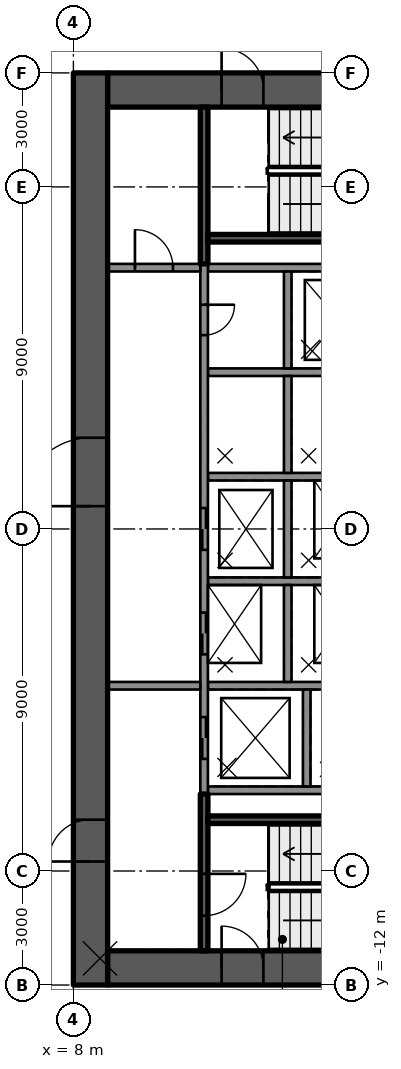
"""IFC4 building model, lengths in metres.
Left out: names, types, materials, properties, quantities, classifications, styles, units other than length and angle.
Written with IfcOpenShell. Run it as: python <this file> out.ifc"""

import sys

from ifc_helpers import new_model, si_unit, direction, frame, frame_2d, origin, place, context, subcontext, project, spatial, rectangle, extrude, element, fill, save


model = new_model("IFC4")
c1 = context("Model", 3, precision=1e-05, world=origin(), true_north=direction((0.0, 1.0)))
c2 = subcontext(c1, "Body", "Model", "MODEL_VIEW")
j1 = project(units=[si_unit("LENGTHUNIT", "METRE"), si_unit("PLANEANGLEUNIT", "RADIAN")], contexts=[c1])
p1 = place(None, origin())
s1 = spatial("IfcSite", under=j1, at=p1, CompositionType="ELEMENT")
p2 = place(p1, origin())
s2 = spatial("IfcBuilding", under=s1, at=p2, CompositionType="ELEMENT")
p3 = place(p2, frame((0.0, 0.0, 102.2)))
s3 = spatial("IfcBuildingStorey", under=s2, at=p3, CompositionType="ELEMENT", Elevation=102.2)
p4 = place(p3, frame((8.9, 11.55, 0.0), z_axis=(0.0, 0.0, 1.0), x_axis=(1.0, 0.0, 0.0)))
e1 = element("IfcWall", 1, at=p4, inside=s3, PredefinedType="SHEAR", context=c2, shape_type="SweptSolid", body=[
    extrude(rectangle(XDim=9.2, YDim=0.9, at=frame_2d((4.6, 0.0))), origin(), (0.0, 0.0, 1.0), 3.5),
])
p5 = place(p4, frame((3.0, 0.0, 0.0)))
e2 = element("IfcOpeningElement", 2, at=p5, cuts=e1, PredefinedType="OPENING", context=c2, shape_type="SweptSolid", body=[
    extrude(rectangle(XDim=1.1, YDim=2.1, at=frame_2d((0.55, 1.05))), frame((0.0, 0.46, 0.0), z_axis=(0.0, -1.0, 0.0), x_axis=(1.0, 0.0, 0.0)), (0.0, 0.0, 1.0), 0.92),
])
p6 = place(p3, frame((8.9, -11.55, 0.0), z_axis=(0.0, 0.0, 1.0), x_axis=(1.0, 0.0, 0.0)))
e3 = element("IfcWall", 3, at=p6, inside=s3, PredefinedType="SHEAR", context=c2, shape_type="SweptSolid", body=[
    extrude(rectangle(XDim=9.2, YDim=0.9, at=frame_2d((4.6, 0.0))), origin(), (0.0, 0.0, 1.0), 3.5),
])
p7 = place(p6, frame((3.0, 0.0, 0.0)))
e4 = element("IfcOpeningElement", 4, at=p7, cuts=e3, PredefinedType="OPENING", context=c2, shape_type="SweptSolid", body=[
    extrude(rectangle(XDim=1.1, YDim=2.1, at=frame_2d((0.55, 1.05))), frame((0.0, 0.46, 0.0), z_axis=(0.0, -1.0, 0.0), x_axis=(1.0, 0.0, 0.0)), (0.0, 0.0, 1.0), 0.92),
])
p8 = place(p3, frame((8.45, -12.0, 0.0), z_axis=(0.0, 0.0, 1.0), x_axis=(0.0, 1.0, 0.0)))
e5 = element("IfcWall", 5, at=p8, inside=s3, PredefinedType="SHEAR", context=c2, shape_type="SweptSolid", body=[
    extrude(rectangle(XDim=24.0, YDim=0.9, at=frame_2d((12.0, 0.0))), origin(), (0.0, 0.0, 1.0), 3.5),
])
p9 = place(p8, frame((12.6, 0.0, 0.0)))
e6 = element("IfcOpeningElement", 6, at=p9, cuts=e5, PredefinedType="OPENING", context=c2, shape_type="SweptSolid", body=[
    extrude(rectangle(XDim=1.8, YDim=2.1, at=frame_2d((0.9, 1.05))), frame((0.0, 0.46, 0.0), z_axis=(0.0, -1.0, 0.0), x_axis=(1.0, 0.0, 0.0)), (0.0, 0.0, 1.0), 0.92),
])
p10 = place(p8, frame((3.25, 0.0, 0.0)))
e7 = element("IfcOpeningElement", 7, at=p10, cuts=e5, PredefinedType="OPENING", context=c2, shape_type="SweptSolid", body=[
    extrude(rectangle(XDim=1.1, YDim=2.1, at=frame_2d((0.55, 1.05))), frame((0.0, 0.46, 0.0), z_axis=(0.0, -1.0, 0.0), x_axis=(1.0, 0.0, 0.0)), (0.0, 0.0, 1.0), 0.92),
])
for number, where, z_axis, x_axis in (
    (8, (11.54, -6.875, 0.0), (0.0, 0.0, 1.0), (1.0, 0.0, 0.0)),
    (9, (11.54, 6.875, 0.0), (0.0, 0.0, 1.0), (1.0, 0.0, 0.0)),
):
    element("IfcWall", number, at=place(p3, frame(where, z_axis=z_axis, x_axis=x_axis)), inside=s3, PredefinedType="SOLIDWALL", context=c2, shape_type="SweptSolid", body=[
        extrude(rectangle(XDim=6.56, YDim=0.2, at=frame_2d((3.28, 0.0))), origin(), (0.0, 0.0, 1.0), 3.09),
    ])
p11 = place(p3, frame((11.54, 4.125, 0.0), z_axis=(0.0, 0.0, 1.0), x_axis=(1.0, 0.0, 0.0)))
e10 = element("IfcWall", 10, at=p11, inside=s3, PredefinedType="SOLIDWALL", context=c2, shape_type="SweptSolid", body=[
    extrude(rectangle(XDim=4.7, YDim=0.2, at=frame_2d((2.35, 0.0))), origin(), (0.0, 0.0, 1.0), 3.09),
])
for number, where, z_axis, x_axis in (
    (11, (11.54, 1.375, 0.0), (0.0, 0.0, 1.0), (1.0, 0.0, 0.0)),
    (12, (11.54, -1.375, 0.0), (0.0, 0.0, 1.0), (1.0, 0.0, 0.0)),
):
    element("IfcWall", number, at=place(p3, frame(where, z_axis=z_axis, x_axis=x_axis)), inside=s3, PredefinedType="SOLIDWALL", context=c2, shape_type="SweptSolid", body=[
        extrude(rectangle(XDim=4.2, YDim=0.2, at=frame_2d((2.1, 0.0))), origin(), (0.0, 0.0, 1.0), 3.09),
    ])
p12 = place(p3, frame((11.54, -4.125, 0.0), z_axis=(0.0, 0.0, 1.0), x_axis=(1.0, 0.0, 0.0)))
e13 = element("IfcWall", 13, at=p12, inside=s3, PredefinedType="SOLIDWALL", context=c2, shape_type="SweptSolid", body=[
    extrude(rectangle(XDim=4.7, YDim=0.2, at=frame_2d((2.35, 0.0))), origin(), (0.0, 0.0, 1.0), 3.09),
])
p13 = place(p3, frame((11.44, 6.975, 0.0), z_axis=(0.0, 0.0, 1.0), x_axis=(0.0, -1.0, 0.0)))
e14 = element("IfcWall", 14, at=p13, inside=s3, PredefinedType="SOLIDWALL", context=c2, shape_type="SweptSolid", body=[
    extrude(rectangle(XDim=13.95, YDim=0.2, at=frame_2d((6.975, 0.0))), origin(), (0.0, 0.0, 1.0), 3.09),
])
p14 = place(p13, frame((6.425, 0.0, 0.0)))
e15 = element("IfcOpeningElement", 15, at=p14, cuts=e14, PredefinedType="OPENING", context=c2, shape_type="SweptSolid", body=[
    extrude(rectangle(XDim=1.1, YDim=2.1, at=frame_2d((0.55, 1.05))), frame((0.0, 0.11, 0.0), z_axis=(0.0, -1.0, 0.0), x_axis=(1.0, 0.0, 0.0)), (0.0, 0.0, 1.0), 0.22),
])
p15 = place(p13, frame((9.175, 0.0, 0.0)))
e16 = element("IfcOpeningElement", 16, at=p15, cuts=e14, PredefinedType="OPENING", context=c2, shape_type="SweptSolid", body=[
    extrude(rectangle(XDim=1.1, YDim=2.1, at=frame_2d((0.55, 1.05))), frame((0.0, 0.11, 0.0), z_axis=(0.0, -1.0, 0.0), x_axis=(1.0, 0.0, 0.0)), (0.0, 0.0, 1.0), 0.22),
])
p16 = place(p13, frame((11.925, 0.0, 0.0)))
e17 = element("IfcOpeningElement", 17, at=p16, cuts=e14, PredefinedType="OPENING", context=c2, shape_type="SweptSolid", body=[
    extrude(rectangle(XDim=1.1, YDim=2.1, at=frame_2d((0.55, 1.05))), frame((0.0, 0.11, 0.0), z_axis=(0.0, -1.0, 0.0), x_axis=(1.0, 0.0, 0.0)), (0.0, 0.0, 1.0), 0.22),
])
p17 = place(p13, frame((1.075, 0.0, 0.0)))
e18 = element("IfcOpeningElement", 18, at=p17, cuts=e14, PredefinedType="OPENING", context=c2, shape_type="SweptSolid", body=[
    extrude(rectangle(XDim=0.8, YDim=2.1, at=frame_2d((0.4, 1.05))), frame((0.0, 0.11, 0.0), z_axis=(0.0, -1.0, 0.0), x_axis=(1.0, 0.0, 0.0)), (0.0, 0.0, 1.0), 0.22),
])
for number, where, z_axis, x_axis in (
    (19, (13.64, 6.775, 0.0), (0.0, 0.0, 1.0), (0.0, -1.0, 0.0)),
    (20, (13.64, 4.025, 0.0), (0.0, 0.0, 1.0), (0.0, -1.0, 0.0)),
    (21, (13.64, 1.275, 0.0), (0.0, 0.0, 1.0), (0.0, -1.0, 0.0)),
    (22, (13.64, -1.475, 0.0), (0.0, 0.0, 1.0), (0.0, -1.0, 0.0)),
    (23, (14.14, -4.225, 0.0), (0.0, 0.0, 1.0), (0.0, -1.0, 0.0)),
):
    element("IfcWall", number, at=place(p3, frame(where, z_axis=z_axis, x_axis=x_axis)), inside=s3, PredefinedType="SOLIDWALL", context=c2, shape_type="SweptSolid", body=[
        extrude(rectangle(XDim=2.55, YDim=0.2, at=frame_2d((1.275, 0.0))), origin(), (0.0, 0.0, 1.0), 3.09),
    ])
p18 = place(p3, frame((11.44, -6.975, 0.0), z_axis=(0.0, 0.0, 1.0), x_axis=(0.0, -1.0, 0.0)))
e24 = element("IfcWall", 24, at=p18, inside=s3, PredefinedType="SOLIDWALL", context=c2, shape_type="SweptSolid", body=[
    extrude(rectangle(XDim=4.125, YDim=0.2, at=frame_2d((2.062, 0.0))), origin(), (0.0, 0.0, 1.0), 3.09),
])
p19 = place(p18, frame((2.1, 0.0, 0.0)))
e25 = element("IfcOpeningElement", 25, at=p19, cuts=e24, PredefinedType="OPENING", context=c2, shape_type="SweptSolid", body=[
    extrude(rectangle(XDim=1.1, YDim=2.1, at=frame_2d((0.55, 1.05))), frame((0.0, 0.11, 0.0), z_axis=(0.0, -1.0, 0.0), x_axis=(1.0, 0.0, 0.0)), (0.0, 0.0, 1.0), 0.22),
])
p20 = place(p3, frame((11.54, -7.65, 0.0), z_axis=(0.0, 0.0, 1.0), x_axis=(1.0, 0.0, 0.0)))
e26 = element("IfcWall", 26, at=p20, inside=s3, PredefinedType="SOLIDWALL", context=c2, shape_type="SweptSolid", body=[
    extrude(rectangle(XDim=6.56, YDim=0.2, at=frame_2d((3.28, 0.0))), origin(), (0.0, 0.0, 1.0), 3.09),
])
p21 = place(p3, frame((11.44, 11.1, 0.0), z_axis=(0.0, 0.0, 1.0), x_axis=(0.0, -1.0, 0.0)))
e27 = element("IfcWall", 27, at=p21, inside=s3, PredefinedType="SOLIDWALL", context=c2, shape_type="SweptSolid", body=[
    extrude(rectangle(XDim=4.125, YDim=0.2, at=frame_2d((2.062, 0.0))), origin(), (0.0, 0.0, 1.0), 3.09),
])
p22 = place(p3, frame((11.54, 7.65, 0.0), z_axis=(0.0, 0.0, 1.0), x_axis=(1.0, 0.0, 0.0)))
e28 = element("IfcWall", 28, at=p22, inside=s3, PredefinedType="SOLIDWALL", context=c2, shape_type="SweptSolid", body=[
    extrude(rectangle(XDim=6.56, YDim=0.2, at=frame_2d((3.28, 0.0))), origin(), (0.0, 0.0, 1.0), 3.09),
])
p23 = place(p3, frame((8.9, -4.125, 0.0), z_axis=(0.0, 0.0, 1.0), x_axis=(1.0, 0.0, 0.0)))
e29 = element("IfcWall", 29, at=p23, inside=s3, PredefinedType="PARTITIONING", context=c2, shape_type="SweptSolid", body=[
    extrude(rectangle(XDim=2.44, YDim=0.2, at=frame_2d((1.22, 0.0))), origin(), (0.0, 0.0, 1.0), 3.09),
])
p24 = place(p3, frame((8.9, 6.875, 0.0), z_axis=(0.0, 0.0, 1.0), x_axis=(1.0, 0.0, 0.0)))
e30 = element("IfcWall", 30, at=p24, inside=s3, PredefinedType="PARTITIONING", context=c2, shape_type="SweptSolid", body=[
    extrude(rectangle(XDim=2.44, YDim=0.2, at=frame_2d((1.22, 0.0))), origin(), (0.0, 0.0, 1.0), 3.09),
])
p25 = place(p24, frame((0.72, 0.0, 0.0)))
e31 = element("IfcOpeningElement", 31, at=p25, cuts=e30, PredefinedType="OPENING", context=c2, shape_type="SweptSolid", body=[
    extrude(rectangle(XDim=1.0, YDim=2.1, at=frame_2d((0.5, 1.05))), frame((0.0, 0.11, 0.0), z_axis=(0.0, -1.0, 0.0), x_axis=(1.0, 0.0, 0.0)), (0.0, 0.0, 1.0), 0.22),
])
p26 = place(p14, origin())
e32 = element("IfcDoor", 32, at=p26, inside=s3, OperationType="DOUBLE_DOOR_SLIDING", PredefinedType="DOOR", context=c2, shape_type="SweptSolid", body=[
    extrude(rectangle(XDim=1.1, YDim=2.1, at=frame_2d((0.55, 1.05))), frame((0.0, 0.025, 0.0), z_axis=(0.0, -1.0, 0.0), x_axis=(1.0, 0.0, 0.0)), (0.0, 0.0, 1.0), 0.05),
])
fill(e15, e32)
p27 = place(p15, origin())
e33 = element("IfcDoor", 33, at=p27, inside=s3, OperationType="DOUBLE_DOOR_SLIDING", PredefinedType="DOOR", context=c2, shape_type="SweptSolid", body=[
    extrude(rectangle(XDim=1.1, YDim=2.1, at=frame_2d((0.55, 1.05))), frame((0.0, 0.025, 0.0), z_axis=(0.0, -1.0, 0.0), x_axis=(1.0, 0.0, 0.0)), (0.0, 0.0, 1.0), 0.05),
])
fill(e16, e33)
p28 = place(p16, origin())
e34 = element("IfcDoor", 34, at=p28, inside=s3, OperationType="DOUBLE_DOOR_SLIDING", PredefinedType="DOOR", context=c2, shape_type="SweptSolid", body=[
    extrude(rectangle(XDim=1.1, YDim=2.1, at=frame_2d((0.55, 1.05))), frame((0.0, 0.025, 0.0), z_axis=(0.0, -1.0, 0.0), x_axis=(1.0, 0.0, 0.0)), (0.0, 0.0, 1.0), 0.05),
])
fill(e17, e34)
p29 = place(p17, origin())
e35 = element("IfcDoor", 35, at=p29, inside=s3, OperationType="SINGLE_SWING_LEFT", PredefinedType="DOOR", context=c2, shape_type="SweptSolid", body=[
    extrude(rectangle(XDim=0.8, YDim=2.1, at=frame_2d((0.4, 1.05))), frame((0.0, 0.025, 0.0), z_axis=(0.0, -1.0, 0.0), x_axis=(1.0, 0.0, 0.0)), (0.0, 0.0, 1.0), 0.05),
])
fill(e18, e35)
p30 = place(p9, origin())
e36 = element("IfcDoor", 36, at=p30, inside=s3, OperationType="SINGLE_SWING_RIGHT", PredefinedType="DOOR", context=c2, shape_type="SweptSolid", body=[
    extrude(rectangle(XDim=1.8, YDim=2.1, at=frame_2d((0.9, 1.05))), frame((0.0, 0.025, 0.0), z_axis=(0.0, -1.0, 0.0), x_axis=(1.0, 0.0, 0.0)), (0.0, 0.0, 1.0), 0.05),
])
fill(e6, e36)
p31 = place(p10, origin())
e37 = element("IfcDoor", 37, at=p31, inside=s3, OperationType="SINGLE_SWING_LEFT", PredefinedType="DOOR", context=c2, shape_type="SweptSolid", body=[
    extrude(rectangle(XDim=1.1, YDim=2.1, at=frame_2d((0.55, 1.05))), frame((0.0, 0.025, 0.0), z_axis=(0.0, -1.0, 0.0), x_axis=(1.0, 0.0, 0.0)), (0.0, 0.0, 1.0), 0.05),
])
fill(e7, e37)
p32 = place(p7, origin())
e38 = element("IfcDoor", 38, at=p32, inside=s3, OperationType="SINGLE_SWING_LEFT", PredefinedType="DOOR", context=c2, shape_type="SweptSolid", body=[
    extrude(rectangle(XDim=1.1, YDim=2.1, at=frame_2d((0.55, 1.05))), frame((0.0, 0.025, 0.0), z_axis=(0.0, -1.0, 0.0), x_axis=(1.0, 0.0, 0.0)), (0.0, 0.0, 1.0), 0.05),
])
fill(e4, e38)
p33 = place(p5, origin())
e39 = element("IfcDoor", 39, at=p33, inside=s3, OperationType="SINGLE_SWING_LEFT", PredefinedType="DOOR", context=c2, shape_type="SweptSolid", body=[
    extrude(rectangle(XDim=1.1, YDim=2.1, at=frame_2d((0.55, 1.05))), frame((0.0, 0.025, 0.0), z_axis=(0.0, -1.0, 0.0), x_axis=(1.0, 0.0, 0.0)), (0.0, 0.0, 1.0), 0.05),
])
fill(e2, e39)
p34 = place(p19, origin())
e40 = element("IfcDoor", 40, at=p34, inside=s3, OperationType="SINGLE_SWING_RIGHT", PredefinedType="DOOR", context=c2, shape_type="SweptSolid", body=[
    extrude(rectangle(XDim=1.1, YDim=2.1, at=frame_2d((0.55, 1.05))), frame((0.0, 0.025, 0.0), z_axis=(0.0, -1.0, 0.0), x_axis=(1.0, 0.0, 0.0)), (0.0, 0.0, 1.0), 0.05),
])
fill(e25, e40)
p35 = place(p25, origin())
e41 = element("IfcDoor", 41, at=p35, inside=s3, OperationType="SINGLE_SWING_RIGHT", PredefinedType="DOOR", context=c2, shape_type="SweptSolid", body=[
    extrude(rectangle(XDim=1.0, YDim=2.1, at=frame_2d((0.5, 1.05))), frame((0.0, 0.025, 0.0), z_axis=(0.0, -1.0, 0.0), x_axis=(1.0, 0.0, 0.0)), (0.0, 0.0, 1.0), 0.05),
])
fill(e31, e41)
save(model, sys.argv[1])
